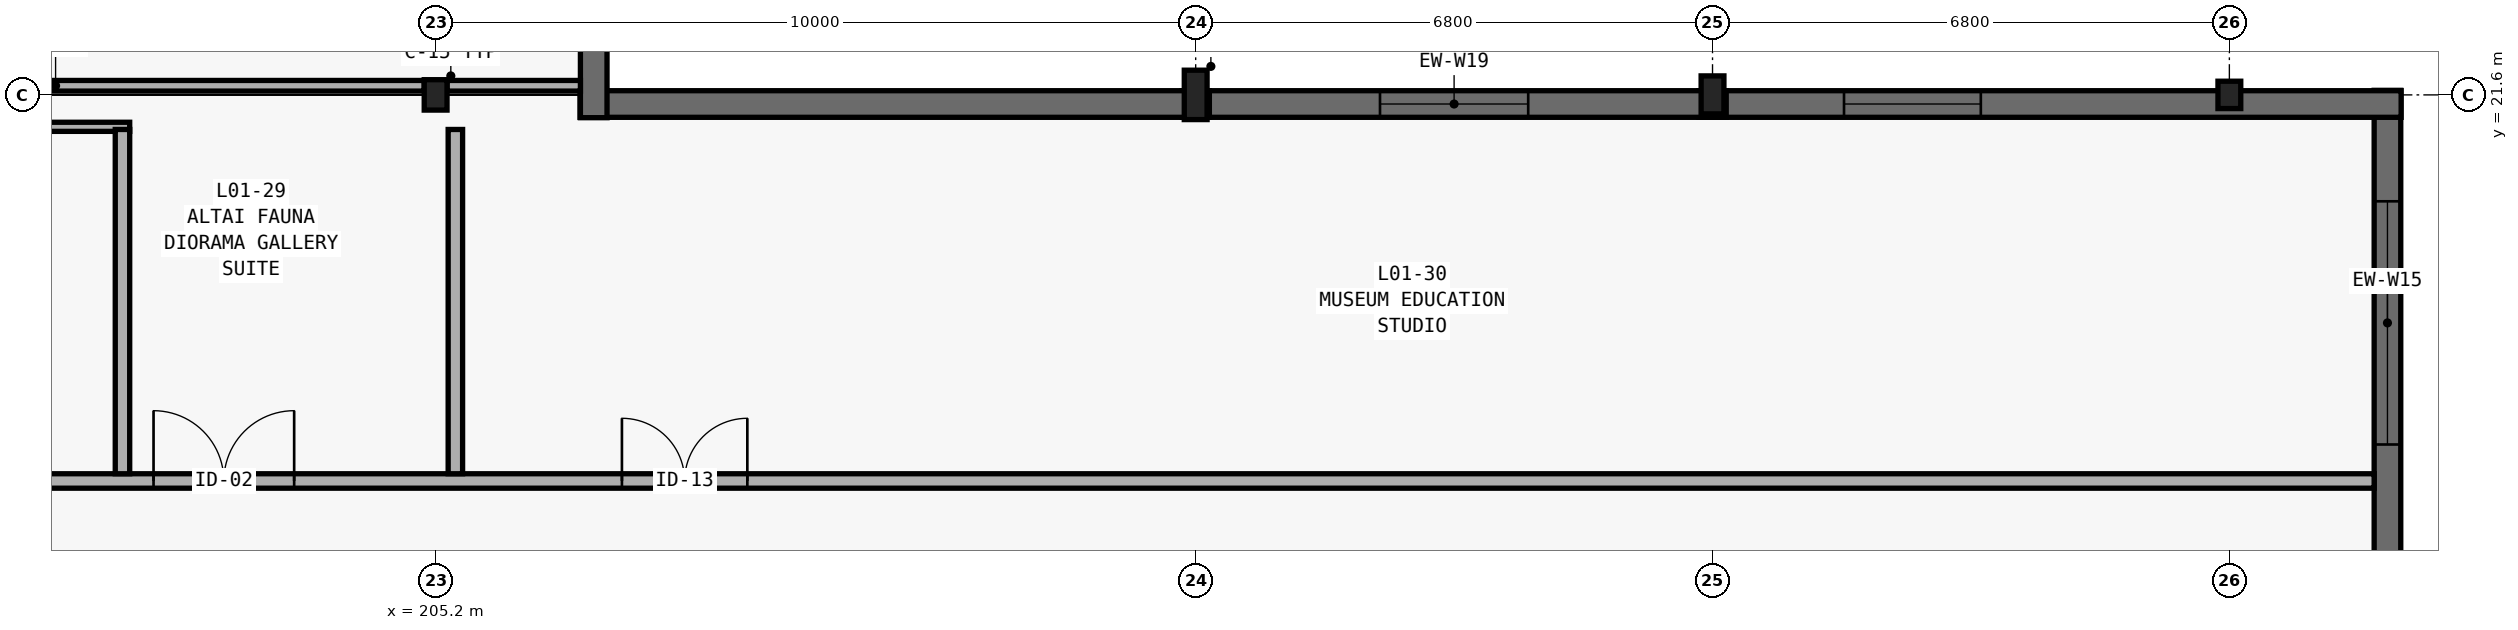
"""IFC4 building model, lengths in metres.
Left out: names, types, materials, properties, quantities, classifications, styles, units other than length and angle.
Written with IfcOpenShell. Run it as: python <this file> out.ifc"""

import sys

from ifc_helpers import new_model, si_unit, direction, frame, frame_2d, origin, origin_2d, place, context, subcontext, project, spatial, rectangle, i_section, extrude, element, fill, save


model = new_model("IFC4")
c1 = context("Model", 3, precision=1e-05, world=origin(), true_north=direction((0.0, 1.0)))
c2 = subcontext(c1, "Body", "Model", "MODEL_VIEW")
j1 = project(units=[si_unit("LENGTHUNIT", "METRE"), si_unit("PLANEANGLEUNIT", "RADIAN")], contexts=[c1])
p1 = place(None, origin())
s1 = spatial("IfcSite", under=j1, at=p1, CompositionType="ELEMENT")
p2 = place(p1, origin())
s2 = spatial("IfcBuilding", under=s1, at=p2, CompositionType="ELEMENT")
p3 = place(p2, frame((0.0, 0.0, 4.8)))
s3 = spatial("IfcBuildingStorey", under=s2, at=p3, CompositionType="ELEMENT", Elevation=4.8)
p4 = place(p3, frame((205.2, 21.6, 0.0), z_axis=(0.0, 0.0, 1.0), x_axis=(1.0, 0.0, 0.0)))
e1 = element("IfcColumn", 1, at=p4, inside=s3, PredefinedType="COLUMN", context=c2, shape_type="SweptSolid", body=[
    extrude(i_section(OverallWidth=0.3, OverallDepth=0.4, WebThickness=0.013, FlangeThickness=0.024, FilletRadius=0.027, at=origin_2d()), origin(), (0.0, 0.0, 1.0), 4.2),
])
p5 = place(p3, frame((215.2, 21.6, 0.0), z_axis=(0.0, 0.0, 1.0), x_axis=(1.0, 0.0, 0.0)))
e2 = element("IfcColumn", 2, at=p5, inside=s3, PredefinedType="COLUMN", context=c2, shape_type="SweptSolid", body=[
    extrude(i_section(OverallWidth=0.3, OverallDepth=0.65, WebThickness=0.016, FlangeThickness=0.031, FilletRadius=0.027, at=origin_2d()), origin(), (0.0, 0.0, 1.0), 4.2),
])
p6 = place(p3, frame((222.0, 21.6, 0.0), z_axis=(0.0, 0.0, 1.0), x_axis=(1.0, 0.0, 0.0)))
e3 = element("IfcColumn", 3, at=p6, inside=s3, PredefinedType="COLUMN", context=c2, shape_type="SweptSolid", body=[
    extrude(i_section(OverallWidth=0.3, OverallDepth=0.5, WebThickness=0.014, FlangeThickness=0.028, FilletRadius=0.027, at=origin_2d()), origin(), (0.0, 0.0, 1.0), 4.2),
])
p7 = place(p3, frame((228.8, 21.6, 0.0), z_axis=(0.0, 0.0, 1.0), x_axis=(1.0, 0.0, 0.0)))
e4 = element("IfcColumn", 4, at=p7, inside=s3, PredefinedType="COLUMN", context=c2, shape_type="SweptSolid", body=[
    extrude(i_section(OverallWidth=0.3, OverallDepth=0.36, WebThickness=0.012, FlangeThickness=0.022, FilletRadius=0.027, at=origin_2d()), origin(), (0.0, 0.0, 1.0), 4.2),
])
p8 = place(p3, frame((230.88, 9.42, 0.0), z_axis=(0.0, 0.0, 1.0), x_axis=(0.0, 1.0, 0.0)))
e5 = element("IfcWall", 5, at=p8, inside=s3, PredefinedType="STANDARD", context=c2, shape_type="SweptSolid", body=[
    extrude(rectangle(XDim=12.24, YDim=0.35, at=frame_2d((6.12, 0.0))), origin(), (0.0, 0.0, 1.0), 3.9),
])
p9 = place(p8, frame((7.58, 0.0, 0.9)))
e6 = element("IfcOpeningElement", 6, at=p9, cuts=e5, PredefinedType="OPENING", context=c2, shape_type="SweptSolid", body=[
    extrude(rectangle(XDim=3.2, YDim=1.2, at=frame_2d((1.6, 0.6))), frame((0.0, 0.19, 0.0), z_axis=(0.0, -1.0, 0.0), x_axis=(1.0, 0.0, 0.0)), (0.0, 0.0, 1.0), 0.38),
])
p10 = place(p3, frame((231.06, 21.48, 0.0), z_axis=(0.0, 0.0, 1.0), x_axis=(-1.0, 0.0, 0.0)))
e7 = element("IfcWall", 7, at=p10, inside=s3, PredefinedType="STANDARD", context=c2, shape_type="SweptSolid", body=[
    extrude(rectangle(XDim=9.24, YDim=0.35, at=frame_2d((4.62, 0.0))), origin(), (0.0, 0.0, 1.0), 3.9),
])
p11 = place(p10, frame((5.53, 0.0, 1.8)))
e8 = element("IfcOpeningElement", 8, at=p11, cuts=e7, PredefinedType="OPENING", context=c2, shape_type="SweptSolid", body=[
    extrude(rectangle(XDim=1.8, YDim=1.1, at=frame_2d((0.9, 0.55))), frame((0.0, 0.19, 0.0), z_axis=(0.0, -1.0, 0.0), x_axis=(1.0, 0.0, 0.0)), (0.0, 0.0, 1.0), 0.38),
])
p12 = place(p3, frame((222.18, 21.48, 0.0), z_axis=(0.0, 0.0, 1.0), x_axis=(-1.0, 0.0, 0.0)))
e9 = element("IfcWall", 9, at=p12, inside=s3, PredefinedType="STANDARD", context=c2, shape_type="SweptSolid", body=[
    extrude(rectangle(XDim=7.16, YDim=0.35, at=frame_2d((3.58, 0.0))), origin(), (0.0, 0.0, 1.0), 3.9),
])
p13 = place(p12, frame((2.605, 0.0, 0.9)))
e10 = element("IfcOpeningElement", 10, at=p13, cuts=e9, PredefinedType="OPENING", context=c2, shape_type="SweptSolid", body=[
    extrude(rectangle(XDim=1.95, YDim=1.8, at=frame_2d((0.975, 0.9))), frame((0.0, 0.19, 0.0), z_axis=(0.0, -1.0, 0.0), x_axis=(1.0, 0.0, 0.0)), (0.0, 0.0, 1.0), 0.38),
])
p14 = place(p3, frame((215.38, 21.48, 0.0), z_axis=(0.0, 0.0, 1.0), x_axis=(-1.0, 0.0, 0.0)))
e11 = element("IfcWall", 11, at=p14, inside=s3, PredefinedType="STANDARD", context=c2, shape_type="SweptSolid", body=[
    extrude(rectangle(XDim=8.28, YDim=0.35, at=frame_2d((4.14, 0.0))), origin(), (0.0, 0.0, 1.0), 3.9),
])
p15 = place(p3, frame((207.28, 21.3, 0.0), z_axis=(0.0, 0.0, 1.0), x_axis=(0.0, 1.0, 0.0)))
e12 = element("IfcWall", 12, at=p15, inside=s3, PredefinedType="STANDARD", context=c2, shape_type="SweptSolid", body=[
    extrude(rectangle(XDim=8.88, YDim=0.35, at=frame_2d((4.44, 0.0))), origin(), (0.0, 0.0, 1.0), 3.9),
])
p16 = place(p3, frame((180.185, 16.52, 0.0), z_axis=(0.0, 0.0, 1.0), x_axis=(1.0, 0.0, 0.0)))
e13 = element("IfcWall", 13, at=p16, inside=s3, PredefinedType="PARTITIONING", context=c2, shape_type="SweptSolid", body=[
    extrude(rectangle(XDim=50.52, YDim=0.19, at=frame_2d((25.26, 0.0))), origin(), (0.0, 0.0, 1.0), 2.76),
])
p17 = place(p16, frame((18.673, 0.0, 0.0)))
e14 = element("IfcOpeningElement", 14, at=p17, cuts=e13, PredefinedType="OPENING", context=c2, shape_type="SweptSolid", body=[
    extrude(rectangle(XDim=1.05, YDim=2.1, at=frame_2d((0.525, 1.05))), frame((0.0, 0.11, 0.0), z_axis=(0.0, -1.0, 0.0), x_axis=(1.0, 0.0, 0.0)), (0.0, 0.0, 1.0), 0.22),
])
p18 = place(p16, frame((12.21, 0.0, 0.0)))
e15 = element("IfcOpeningElement", 15, at=p18, cuts=e13, PredefinedType="OPENING", context=c2, shape_type="SweptSolid", body=[
    extrude(rectangle(XDim=1.85, YDim=2.35, at=frame_2d((0.925, 1.175))), frame((0.0, 0.11, 0.0), z_axis=(0.0, -1.0, 0.0), x_axis=(1.0, 0.0, 0.0)), (0.0, 0.0, 1.0), 0.22),
])
p19 = place(p16, frame((21.304, 0.0, 0.0)))
e16 = element("IfcOpeningElement", 16, at=p19, cuts=e13, PredefinedType="OPENING", context=c2, shape_type="SweptSolid", body=[
    extrude(rectangle(XDim=1.85, YDim=2.35, at=frame_2d((0.925, 1.175))), frame((0.0, 0.11, 0.0), z_axis=(0.0, -1.0, 0.0), x_axis=(1.0, 0.0, 0.0)), (0.0, 0.0, 1.0), 0.22),
])
p20 = place(p16, frame((27.466, 0.0, 0.0)))
e17 = element("IfcOpeningElement", 17, at=p20, cuts=e13, PredefinedType="OPENING", context=c2, shape_type="SweptSolid", body=[
    extrude(rectangle(XDim=1.65, YDim=2.25, at=frame_2d((0.825, 1.125))), frame((0.0, 0.11, 0.0), z_axis=(0.0, -1.0, 0.0), x_axis=(1.0, 0.0, 0.0)), (0.0, 0.0, 1.0), 0.22),
])
p21 = place(p3, frame((196.225, 21.18, 0.0), z_axis=(0.0, 0.0, 1.0), x_axis=(1.0, 0.0, 0.0)))
e18 = element("IfcWall", 18, at=p21, inside=s3, PredefinedType="PARTITIONING", context=c2, shape_type="SweptSolid", body=[
    extrude(rectangle(XDim=4.95, YDim=0.12, at=frame_2d((2.475, 0.0))), origin(), (0.0, 0.0, 1.0), 2.76),
])
p22 = place(p3, frame((195.35, 21.72, 0.0), z_axis=(0.0, 0.0, 1.0), x_axis=(1.0, 0.0, 0.0)))
e19 = element("IfcWall", 19, at=p22, inside=s3, PredefinedType="PARTITIONING", context=c2, shape_type="SweptSolid", body=[
    extrude(rectangle(XDim=9.7, YDim=0.14, at=frame_2d((4.85, 0.0))), origin(), (0.0, 0.0, 1.0), 2.76),
])
p23 = place(p3, frame((205.35, 21.72, 0.0), z_axis=(0.0, 0.0, 1.0), x_axis=(1.0, 0.0, 0.0)))
e20 = element("IfcWall", 20, at=p23, inside=s3, PredefinedType="PARTITIONING", context=c2, shape_type="SweptSolid", body=[
    extrude(rectangle(XDim=1.755, YDim=0.14, at=frame_2d((0.877, 0.0))), origin(), (0.0, 0.0, 1.0), 2.76),
])
for number, where, z_axis, x_axis in (
    (21, (201.08, 16.615, 0.0), (0.0, 0.0, 1.0), (0.0, 1.0, 0.0)),
    (22, (205.46, 16.615, 0.0), (0.0, 0.0, 1.0), (0.0, 1.0, 0.0)),
):
    element("IfcWall", number, at=place(p3, frame(where, z_axis=z_axis, x_axis=x_axis)), inside=s3, PredefinedType="PARTITIONING", context=c2, shape_type="SweptSolid", body=[
        extrude(rectangle(XDim=4.53, YDim=0.19, at=frame_2d((2.265, 0.0))), origin(), (0.0, 0.0, 1.0), 2.76),
    ])
p24 = place(p9, origin())
e23 = element("IfcWindow", 23, at=p24, inside=s3, PartitioningType="SINGLE_PANEL", PredefinedType="WINDOW", context=c2, shape_type="SweptSolid", body=[
    extrude(rectangle(XDim=3.2, YDim=1.2, at=frame_2d((1.6, 0.6))), frame((0.0, 0.03, 0.0), z_axis=(0.0, -1.0, 0.0), x_axis=(1.0, 0.0, 0.0)), (0.0, 0.0, 1.0), 0.06),
])
fill(e6, e23)
p25 = place(p11, origin())
e24 = element("IfcWindow", 24, at=p25, inside=s3, PartitioningType="SINGLE_PANEL", PredefinedType="WINDOW", context=c2, shape_type="SweptSolid", body=[
    extrude(rectangle(XDim=1.8, YDim=1.1, at=frame_2d((0.9, 0.55))), frame((0.0, 0.03, 0.0), z_axis=(0.0, -1.0, 0.0), x_axis=(1.0, 0.0, 0.0)), (0.0, 0.0, 1.0), 0.06),
])
fill(e8, e24)
p26 = place(p13, origin())
e25 = element("IfcWindow", 25, at=p26, inside=s3, PartitioningType="SINGLE_PANEL", PredefinedType="WINDOW", context=c2, shape_type="SweptSolid", body=[
    extrude(rectangle(XDim=1.95, YDim=1.8, at=frame_2d((0.975, 0.9))), frame((0.0, 0.03, 0.0), z_axis=(0.0, -1.0, 0.0), x_axis=(1.0, 0.0, 0.0)), (0.0, 0.0, 1.0), 0.06),
])
fill(e10, e25)
p27 = place(p19, origin())
e26 = element("IfcDoor", 26, at=p27, inside=s3, OperationType="DOUBLE_DOOR_SINGLE_SWING", PredefinedType="DOOR", context=c2, shape_type="SweptSolid", body=[
    extrude(rectangle(XDim=1.85, YDim=2.35, at=frame_2d((0.925, 1.175))), frame((0.0, 0.025, 0.0), z_axis=(0.0, -1.0, 0.0), x_axis=(1.0, 0.0, 0.0)), (0.0, 0.0, 1.0), 0.05),
])
fill(e16, e26)
p28 = place(p20, origin())
e27 = element("IfcDoor", 27, at=p28, inside=s3, OperationType="DOUBLE_DOOR_SINGLE_SWING", PredefinedType="DOOR", context=c2, shape_type="SweptSolid", body=[
    extrude(rectangle(XDim=1.65, YDim=2.25, at=frame_2d((0.825, 1.125))), frame((0.0, 0.025, 0.0), z_axis=(0.0, -1.0, 0.0), x_axis=(1.0, 0.0, 0.0)), (0.0, 0.0, 1.0), 0.05),
])
fill(e17, e27)
save(model, sys.argv[1])
